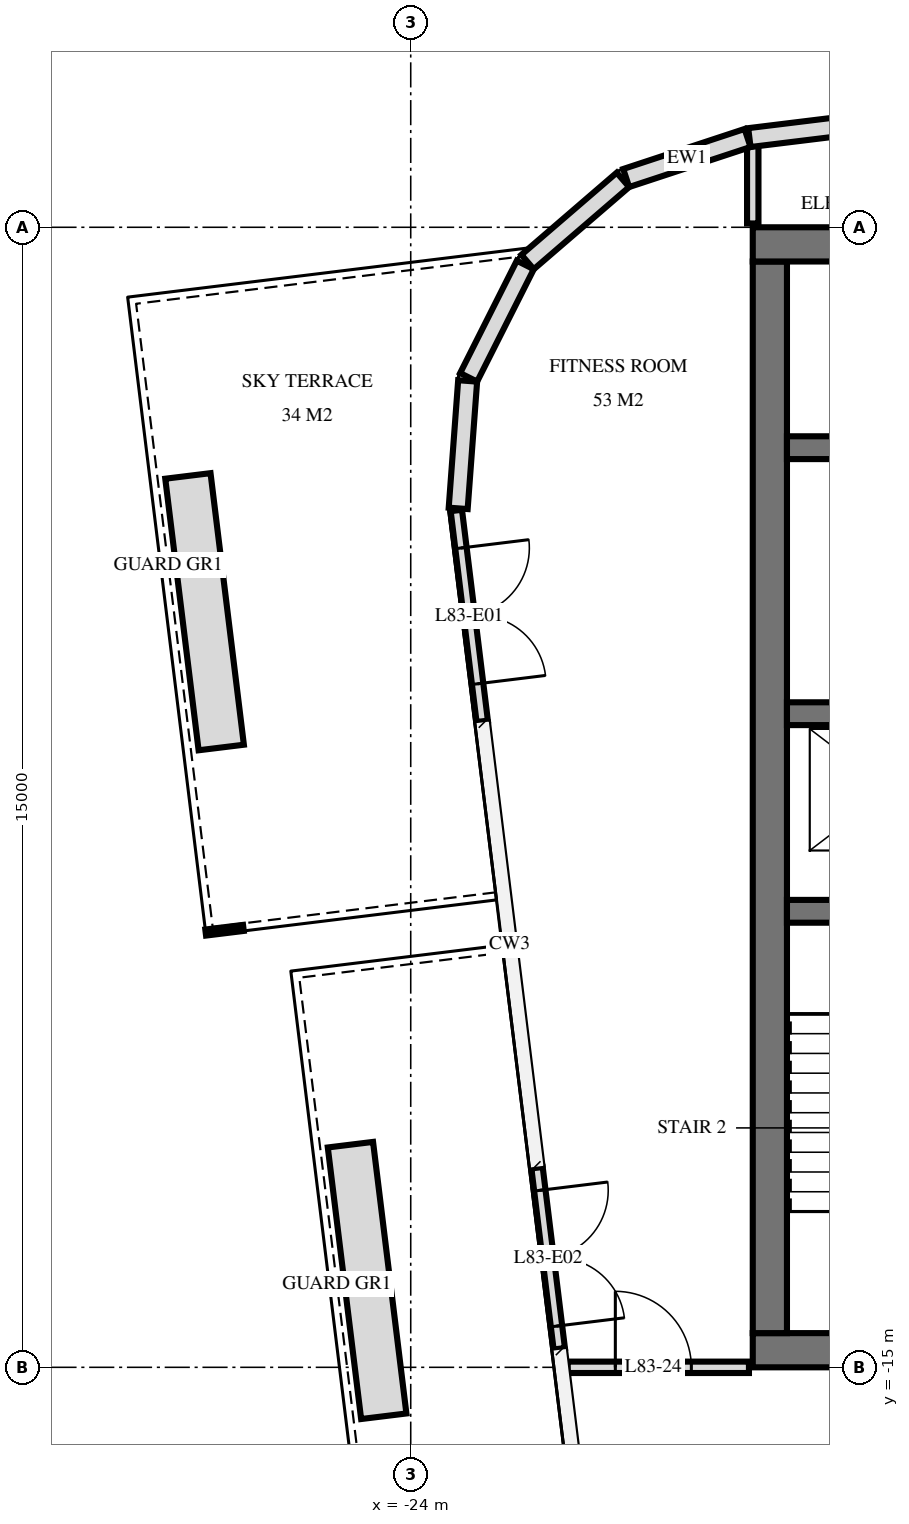
"""IFC4 building model, lengths in metres.
Left out: names, types, materials, properties, quantities, classifications, styles, units other than length and angle.
Written with IfcOpenShell. Run it as: python <this file> out.ifc"""

import sys

from ifc_helpers import new_model, si_unit, direction, frame, frame_2d, origin, place, context, subcontext, project, spatial, rectangle, extrude, element, fill, save


model = new_model("IFC4")
c1 = context("Model", 3, precision=1e-05, world=origin(), true_north=direction((0.0, 1.0)))
c2 = subcontext(c1, "Body", "Model", "MODEL_VIEW")
j1 = project(units=[si_unit("LENGTHUNIT", "METRE"), si_unit("PLANEANGLEUNIT", "RADIAN")], contexts=[c1])
p1 = place(None, origin())
s1 = spatial("IfcSite", under=j1, at=p1, CompositionType="ELEMENT")
p2 = place(p1, origin())
s2 = spatial("IfcBuilding", under=s1, at=p2, CompositionType="ELEMENT")
p3 = place(p2, frame((0.0, 0.0, 314.6)))
s3 = spatial("IfcBuildingStorey", under=s2, at=p3, CompositionType="ELEMENT", Elevation=314.6)
p4 = place(p3, frame((-19.5, -0.225, 0.0), z_axis=(0.0, 0.0, 1.0), x_axis=(1.0, 0.0, 0.0)))
e1 = element("IfcWall", 1, at=p4, inside=s3, PredefinedType="SHEAR", context=c2, shape_type="SweptSolid", body=[
    extrude(rectangle(XDim=9.5, YDim=0.45, at=frame_2d((4.75, 0.0))), origin(), (0.0, 0.0, 1.0), 4.0),
])
p5 = place(p3, frame((-19.5, -14.775, 0.0), z_axis=(0.0, 0.0, 1.0), x_axis=(1.0, 0.0, 0.0)))
e2 = element("IfcWall", 2, at=p5, inside=s3, PredefinedType="SHEAR", context=c2, shape_type="SweptSolid", body=[
    extrude(rectangle(XDim=9.5, YDim=0.45, at=frame_2d((4.75, 0.0))), origin(), (0.0, 0.0, 1.0), 4.0),
])
p6 = place(p5, frame((1.2, 0.0, 0.0)))
e3 = element("IfcOpeningElement", 3, at=p6, cuts=e2, PredefinedType="OPENING", context=c2, shape_type="SweptSolid", body=[
    extrude(rectangle(XDim=1.2, YDim=2.1, at=frame_2d((0.6, 1.05))), frame((0.0, 0.235, 0.0), z_axis=(0.0, -1.0, 0.0), x_axis=(1.0, 0.0, 0.0)), (0.0, 0.0, 1.0), 0.47),
])
p7 = place(p5, frame((4.25, 0.0, 0.0)))
e4 = element("IfcOpeningElement", 4, at=p7, cuts=e2, PredefinedType="OPENING", context=c2, shape_type="SweptSolid", body=[
    extrude(rectangle(XDim=1.1, YDim=2.1, at=frame_2d((0.55, 1.05))), frame((0.0, 0.235, 0.0), z_axis=(0.0, -1.0, 0.0), x_axis=(1.0, 0.0, 0.0)), (0.0, 0.0, 1.0), 0.47),
])
p8 = place(p3, frame((-19.275, -14.55, 0.0), z_axis=(0.0, 0.0, 1.0), x_axis=(0.0, 1.0, 0.0)))
e5 = element("IfcWall", 5, at=p8, inside=s3, PredefinedType="SHEAR", context=c2, shape_type="SweptSolid", body=[
    extrude(rectangle(XDim=14.1, YDim=0.45, at=frame_2d((7.05, 0.0))), origin(), (0.0, 0.0, 1.0), 4.0),
])
p9 = place(p3, frame((-19.05, -2.9, 0.0), z_axis=(0.0, 0.0, 1.0), x_axis=(1.0, 0.0, 0.0)))
e6 = element("IfcWall", 6, at=p9, inside=s3, PredefinedType="SHEAR", context=c2, shape_type="SweptSolid", body=[
    extrude(rectangle(XDim=8.7, YDim=0.3, at=frame_2d((4.35, 0.0))), origin(), (0.0, 0.0, 1.0), 4.0),
])
p10 = place(p9, frame((6.8, 0.0, 0.0)))
e7 = element("IfcOpeningElement", 7, at=p10, cuts=e6, PredefinedType="OPENING", context=c2, shape_type="SweptSolid", body=[
    extrude(rectangle(XDim=1.1, YDim=2.1, at=frame_2d((0.55, 1.05))), frame((0.0, 0.16, 0.0), z_axis=(0.0, -1.0, 0.0), x_axis=(1.0, 0.0, 0.0)), (0.0, 0.0, 1.0), 0.32),
])
p11 = place(p9, frame((3.8, 0.0, 0.0)))
e8 = element("IfcOpeningElement", 8, at=p11, cuts=e6, PredefinedType="OPENING", context=c2, shape_type="SweptSolid", body=[
    extrude(rectangle(XDim=1.1, YDim=2.1, at=frame_2d((0.55, 1.05))), frame((0.0, 0.16, 0.0), z_axis=(0.0, -1.0, 0.0), x_axis=(1.0, 0.0, 0.0)), (0.0, 0.0, 1.0), 0.32),
])
p12 = place(p9, frame((0.9, 0.0, 0.0)))
e9 = element("IfcOpeningElement", 9, at=p12, cuts=e6, PredefinedType="OPENING", context=c2, shape_type="SweptSolid", body=[
    extrude(rectangle(XDim=0.9, YDim=2.1, at=frame_2d((0.45, 1.05))), frame((0.0, 0.16, 0.0), z_axis=(0.0, -1.0, 0.0), x_axis=(1.0, 0.0, 0.0)), (0.0, 0.0, 1.0), 0.32),
])
p13 = place(p3, frame((-19.05, -6.4, 0.0), z_axis=(0.0, 0.0, 1.0), x_axis=(1.0, 0.0, 0.0)))
e10 = element("IfcWall", 10, at=p13, inside=s3, PredefinedType="SHEAR", context=c2, shape_type="SweptSolid", body=[
    extrude(rectangle(XDim=8.7, YDim=0.3, at=frame_2d((4.35, 0.0))), origin(), (0.0, 0.0, 1.0), 4.0),
])
p14 = place(p13, frame((0.8, 0.0, 0.0)))
e11 = element("IfcOpeningElement", 11, at=p14, cuts=e10, PredefinedType="OPENING", context=c2, shape_type="SweptSolid", body=[
    extrude(rectangle(XDim=1.1, YDim=2.1, at=frame_2d((0.55, 1.05))), frame((0.0, 0.16, 0.0), z_axis=(0.0, -1.0, 0.0), x_axis=(1.0, 0.0, 0.0)), (0.0, 0.0, 1.0), 0.32),
])
p15 = place(p3, frame((-19.05, -9.0, 0.0), z_axis=(0.0, 0.0, 1.0), x_axis=(1.0, 0.0, 0.0)))
e12 = element("IfcWall", 12, at=p15, inside=s3, PredefinedType="SHEAR", context=c2, shape_type="SweptSolid", body=[
    extrude(rectangle(XDim=8.7, YDim=0.3, at=frame_2d((4.35, 0.0))), origin(), (0.0, 0.0, 1.0), 4.0),
])
p16 = place(p15, frame((3.8, 0.0, 0.0)))
e13 = element("IfcOpeningElement", 13, at=p16, cuts=e12, PredefinedType="OPENING", context=c2, shape_type="SweptSolid", body=[
    extrude(rectangle(XDim=1.1, YDim=2.1, at=frame_2d((0.55, 1.05))), frame((0.0, 0.16, 0.0), z_axis=(0.0, -1.0, 0.0), x_axis=(1.0, 0.0, 0.0)), (0.0, 0.0, 1.0), 0.32),
])
p17 = place(p3, frame((16.138, 5.561, 0.0), z_axis=(0.0, 0.0, 1.0), x_axis=(-0.992546726876, -0.121864658405, 0.0)))
e14 = element("IfcWall", 14, at=p17, inside=s3, PredefinedType="SOLIDWALL", context=c2, shape_type="SweptSolid", body=[
    extrude(rectangle(XDim=35.951, YDim=0.25, at=frame_2d((17.975, 0.0))), origin(), (0.0, 0.0, 1.0), 3.72),
])
p18 = place(p3, frame((-19.568, 1.175, 0.0), z_axis=(0.0, 0.0, 1.0), x_axis=(-0.949694735798, -0.313177120489, 0.0)))
e15 = element("IfcWall", 15, at=p18, inside=s3, PredefinedType="SOLIDWALL", context=c2, shape_type="SweptSolid", body=[
    extrude(rectangle(XDim=1.681, YDim=0.25, at=frame_2d((0.841, 0.0))), origin(), (0.0, 0.0, 1.0), 3.72),
])
p19 = place(p3, frame((-21.208, 0.624, 0.0), z_axis=(0.0, 0.0, 1.0), x_axis=(-0.757568315466, -0.652755886531, 0.0)))
e16 = element("IfcWall", 16, at=p19, inside=s3, PredefinedType="SOLIDWALL", context=c2, shape_type="SweptSolid", body=[
    extrude(rectangle(XDim=1.656, YDim=0.25, at=frame_2d((0.828, 0.0))), origin(), (0.0, 0.0, 1.0), 3.72),
])
p20 = place(p3, frame((-22.493, -0.495, 0.0), z_axis=(0.0, 0.0, 1.0), x_axis=(-0.449982385812, -0.893037430604, 0.0)))
e17 = element("IfcWall", 17, at=p20, inside=s3, PredefinedType="SOLIDWALL", context=c2, shape_type="SweptSolid", body=[
    extrude(rectangle(XDim=1.656, YDim=0.25, at=frame_2d((0.828, 0.0))), origin(), (0.0, 0.0, 1.0), 3.72),
])
p21 = place(p3, frame((-23.251, -2.021, 0.0), z_axis=(0.0, 0.0, 1.0), x_axis=(-0.074053534713, -0.997254267475, 0.0)))
e18 = element("IfcWall", 18, at=p21, inside=s3, PredefinedType="SOLIDWALL", context=c2, shape_type="SweptSolid", body=[
    extrude(rectangle(XDim=1.681, YDim=0.25, at=frame_2d((0.841, 0.0))), origin(), (0.0, 0.0, 1.0), 3.72),
])
p22 = place(p3, frame((-23.4, -3.726, 0.0), z_axis=(0.0, 0.0, 1.0), x_axis=(0.121830924856, -0.992550868091, 0.0)))
e19 = element("IfcWall", 19, at=p22, inside=s3, PredefinedType="USERDEFINED", context=c2, shape_type="SweptSolid", body=[
    extrude(rectangle(XDim=2.795, YDim=0.15, at=frame_2d((1.398, 0.0))), origin(), (0.0, 0.0, 1.0), 3.72),
])
p23 = place(p22, frame((0.498, 0.0, 0.0)))
e20 = element("IfcOpeningElement", 20, at=p23, cuts=e19, PredefinedType="OPENING", context=c2, shape_type="SweptSolid", body=[
    extrude(rectangle(XDim=1.8, YDim=2.4, at=frame_2d((0.9, 1.2))), frame((0.0, 0.085, 0.0), z_axis=(0.0, -1.0, 0.0), x_axis=(1.0, 0.0, 0.0)), (0.0, 0.0, 1.0), 0.17),
])
p24 = place(p3, frame((-22.338, -12.374, 0.0), z_axis=(0.0, 0.0, 1.0), x_axis=(0.121868445399, -0.992546261902, 0.0)))
e21 = element("IfcWall", 21, at=p24, inside=s3, PredefinedType="USERDEFINED", context=c2, shape_type="SweptSolid", body=[
    extrude(rectangle(XDim=2.4, YDim=0.15, at=frame_2d((1.2, 0.0))), origin(), (0.0, 0.0, 1.0), 3.72),
])
p25 = place(p24, frame((0.3, 0.0, 0.0)))
e22 = element("IfcOpeningElement", 22, at=p25, cuts=e21, PredefinedType="OPENING", context=c2, shape_type="SweptSolid", body=[
    extrude(rectangle(XDim=1.8, YDim=2.4, at=frame_2d((0.9, 1.2))), frame((0.0, 0.085, 0.0), z_axis=(0.0, -1.0, 0.0), x_axis=(1.0, 0.0, 0.0)), (0.0, 0.0, 1.0), 0.17),
])
for number, where, z_axis, x_axis in (
    (23, (-24.355, -15.644, 0.0), (0.0, 0.0, 1.0), (-0.122, 0.993, 0.0)),
    (24, (-26.493, -6.845, 0.0), (0.0, 0.0, 1.0), (-0.122, 0.993, 0.0)),
):
    element("IfcWall", number, at=place(p3, frame(where, z_axis=z_axis, x_axis=x_axis)), inside=s3, PredefinedType="USERDEFINED", context=c2, shape_type="SweptSolid", body=[
        extrude(rectangle(XDim=3.6, YDim=0.6, at=frame_2d((1.8, 0.0))), origin(), (0.0, 0.0, 1.0), 0.65),
    ])
p26 = place(p3, frame((-19.5, 0.05, 0.0), z_axis=(0.0, 0.0, 1.0), x_axis=(0.0, 1.0, 0.0)))
e25 = element("IfcWall", 25, at=p26, inside=s3, PredefinedType="PARTITIONING", context=c2, shape_type="SweptSolid", body=[
    extrude(rectangle(XDim=1.08, YDim=0.15, at=frame_2d((0.54, 0.0))), origin(), (0.0, 0.0, 1.0), 3.72),
])
p27 = place(p3, frame((-21.935, -15.0, 0.0), z_axis=(0.0, 0.0, 1.0), x_axis=(1.0, 0.0, 0.0)))
e26 = element("IfcWall", 26, at=p27, inside=s3, PredefinedType="PARTITIONING", context=c2, shape_type="SweptSolid", body=[
    extrude(rectangle(XDim=2.385, YDim=0.15, at=frame_2d((1.192, 0.0))), origin(), (0.0, 0.0, 1.0), 3.72),
])
p28 = place(p27, frame((0.627, 0.0, 0.0)))
e27 = element("IfcOpeningElement", 27, at=p28, cuts=e26, PredefinedType="OPENING", context=c2, shape_type="SweptSolid", body=[
    extrude(rectangle(XDim=1.0, YDim=2.1, at=frame_2d((0.5, 1.05))), frame((0.0, 0.085, 0.0), z_axis=(0.0, -1.0, 0.0), x_axis=(1.0, 0.0, 0.0)), (0.0, 0.0, 1.0), 0.17),
])
p29 = place(p23, origin())
e28 = element("IfcDoor", 28, at=p29, inside=s3, OperationType="DOUBLE_DOOR_SINGLE_SWING", PredefinedType="DOOR", context=c2, shape_type="SweptSolid", body=[
    extrude(rectangle(XDim=1.8, YDim=2.4, at=frame_2d((0.9, 1.2))), frame((0.0, 0.025, 0.0), z_axis=(0.0, -1.0, 0.0), x_axis=(1.0, 0.0, 0.0)), (0.0, 0.0, 1.0), 0.05),
])
fill(e20, e28)
p30 = place(p25, origin())
e29 = element("IfcDoor", 29, at=p30, inside=s3, OperationType="DOUBLE_DOOR_SINGLE_SWING", PredefinedType="DOOR", context=c2, shape_type="SweptSolid", body=[
    extrude(rectangle(XDim=1.8, YDim=2.4, at=frame_2d((0.9, 1.2))), frame((0.0, 0.025, 0.0), z_axis=(0.0, -1.0, 0.0), x_axis=(1.0, 0.0, 0.0)), (0.0, 0.0, 1.0), 0.05),
])
fill(e22, e29)
p31 = place(p28, origin())
e30 = element("IfcDoor", 30, at=p31, inside=s3, OperationType="SINGLE_SWING_RIGHT", PredefinedType="DOOR", context=c2, shape_type="SweptSolid", body=[
    extrude(rectangle(XDim=1.0, YDim=2.1, at=frame_2d((0.5, 1.05))), frame((0.0, 0.025, 0.0), z_axis=(0.0, -1.0, 0.0), x_axis=(1.0, 0.0, 0.0)), (0.0, 0.0, 1.0), 0.05),
])
fill(e27, e30)
save(model, sys.argv[1])
